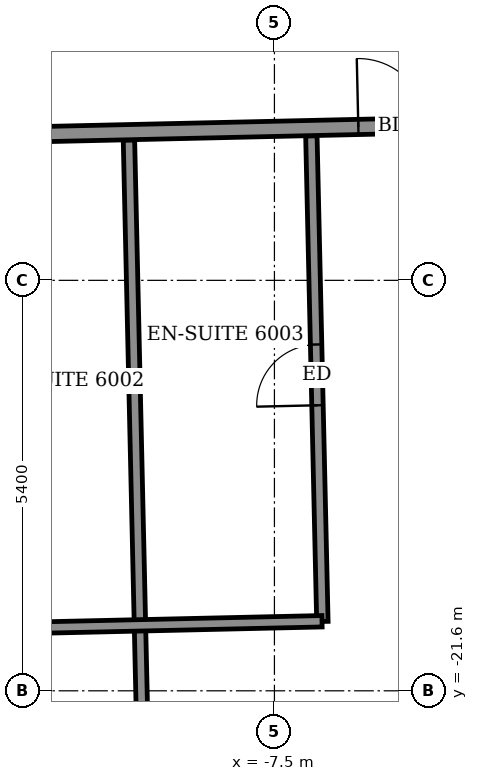
"""IFC4 building model, lengths in metres.
Left out: names, types, materials, properties, quantities, classifications, styles, units other than length and angle.
Written with IfcOpenShell. Run it as: python <this file> out.ifc"""

import sys

from ifc_helpers import new_model, si_unit, direction, frame, frame_2d, origin, place, context, subcontext, project, spatial, rectangle, extrude, element, fill, save


model = new_model("IFC4")
c1 = context("Model", 3, precision=1e-05, world=origin(), true_north=direction((0.0, 1.0)))
c2 = subcontext(c1, "Body", "Model", "MODEL_VIEW")
j1 = project(units=[si_unit("LENGTHUNIT", "METRE"), si_unit("PLANEANGLEUNIT", "RADIAN")], contexts=[c1])
p1 = place(None, origin())
s1 = spatial("IfcSite", under=j1, at=p1, CompositionType="ELEMENT")
p2 = place(p1, origin())
s2 = spatial("IfcBuilding", under=s1, at=p2, CompositionType="ELEMENT")
p3 = place(p2, frame((0.0, 0.0, 238.3)))
s3 = spatial("IfcBuildingStorey", under=s2, at=p3, CompositionType="ELEMENT", Elevation=238.3)
p4 = place(p3, frame((-9.156, -25.728, 0.0), z_axis=(0.0, 0.0, 1.0), x_axis=(-0.022684355347, 0.999742676904, 0.0)))
e1 = element("IfcWall", 1, at=p4, inside=s3, PredefinedType="PARTITIONING", context=c2, shape_type="SweptSolid", body=[
    extrude(rectangle(XDim=11.376, YDim=0.15, at=frame_2d((5.688, 0.0))), origin(), (0.0, 0.0, 1.0), 3.05),
])
p5 = place(p3, frame((-6.869, -20.688, 0.0), z_axis=(0.0, 0.0, 1.0), x_axis=(-0.022696235044, 0.99974240728, 0.0)))
e2 = element("IfcWall", 2, at=p5, inside=s3, PredefinedType="PARTITIONING", context=c2, shape_type="SweptSolid", body=[
    extrude(rectangle(XDim=6.39, YDim=0.15, at=frame_2d((3.195, 0.0))), origin(), (0.0, 0.0, 1.0), 3.05),
])
p6 = place(p5, frame((2.845, 0.0, 0.0)))
e3 = element("IfcOpeningElement", 3, at=p6, cuts=e2, PredefinedType="OPENING", context=c2, shape_type="SweptSolid", body=[
    extrude(rectangle(XDim=0.8, YDim=2.1, at=frame_2d((0.4, 1.05))), frame((0.0, 0.085, 0.0), z_axis=(0.0, -1.0, 0.0), x_axis=(1.0, 0.0, 0.0)), (0.0, 0.0, 1.0), 0.17),
])
p7 = place(p3, frame((-11.672, -20.793, 0.0), z_axis=(0.0, 0.0, 1.0), x_axis=(0.999747191239, 0.022484519337, 0.0)))
e4 = element("IfcWall", 4, at=p7, inside=s3, PredefinedType="PARTITIONING", context=c2, shape_type="SweptSolid", body=[
    extrude(rectangle(XDim=4.799, YDim=0.15, at=frame_2d((2.4, 0.0))), origin(), (0.0, 0.0, 1.0), 3.05),
])
p8 = place(p3, frame((-27.016, -14.65, 0.0), z_axis=(0.0, 0.0, 1.0), x_axis=(0.999742623033, 0.022686729391, 0.0)))
e5 = element("IfcWall", 5, at=p8, inside=s3, PredefinedType="PARTITIONING", context=c2, shape_type="SweptSolid", body=[
    extrude(rectangle(XDim=50.858, YDim=0.2, at=frame_2d((25.429, 0.0))), origin(), (0.0, 0.0, 1.0), 3.05),
])
p9 = place(p8, frame((1.625, 0.0, 0.0)))
e6 = element("IfcOpeningElement", 6, at=p9, cuts=e5, PredefinedType="OPENING", context=c2, shape_type="SweptSolid", body=[
    extrude(rectangle(XDim=1.0, YDim=2.1, at=frame_2d((0.5, 1.05))), frame((0.0, 0.11, 0.0), z_axis=(0.0, -1.0, 0.0), x_axis=(1.0, 0.0, 0.0)), (0.0, 0.0, 1.0), 0.22),
])
p10 = place(p8, frame((6.6, 0.0, 0.0)))
e7 = element("IfcOpeningElement", 7, at=p10, cuts=e5, PredefinedType="OPENING", context=c2, shape_type="SweptSolid", body=[
    extrude(rectangle(XDim=0.9, YDim=2.1, at=frame_2d((0.45, 1.05))), frame((0.0, 0.11, 0.0), z_axis=(0.0, -1.0, 0.0), x_axis=(1.0, 0.0, 0.0)), (0.0, 0.0, 1.0), 0.22),
])
p11 = place(p8, frame((11.5, 0.0, 0.0)))
e8 = element("IfcOpeningElement", 8, at=p11, cuts=e5, PredefinedType="OPENING", context=c2, shape_type="SweptSolid", body=[
    extrude(rectangle(XDim=0.9, YDim=2.1, at=frame_2d((0.45, 1.05))), frame((0.0, 0.11, 0.0), z_axis=(0.0, -1.0, 0.0), x_axis=(1.0, 0.0, 0.0)), (0.0, 0.0, 1.0), 0.22),
])
p12 = place(p8, frame((13.675, 0.0, 0.0)))
e9 = element("IfcOpeningElement", 9, at=p12, cuts=e5, PredefinedType="OPENING", context=c2, shape_type="SweptSolid", body=[
    extrude(rectangle(XDim=0.9, YDim=2.1, at=frame_2d((0.45, 1.05))), frame((0.0, 0.11, 0.0), z_axis=(0.0, -1.0, 0.0), x_axis=(1.0, 0.0, 0.0)), (0.0, 0.0, 1.0), 0.22),
])
p13 = place(p8, frame((20.625, 0.0, 0.0)))
e10 = element("IfcOpeningElement", 10, at=p13, cuts=e5, PredefinedType="OPENING", context=c2, shape_type="SweptSolid", body=[
    extrude(rectangle(XDim=0.9, YDim=2.1, at=frame_2d((0.45, 1.05))), frame((0.0, 0.11, 0.0), z_axis=(0.0, -1.0, 0.0), x_axis=(1.0, 0.0, 0.0)), (0.0, 0.0, 1.0), 0.22),
])
p14 = place(p8, frame((22.775, 0.0, 0.0)))
e11 = element("IfcOpeningElement", 11, at=p14, cuts=e5, PredefinedType="OPENING", context=c2, shape_type="SweptSolid", body=[
    extrude(rectangle(XDim=0.9, YDim=2.1, at=frame_2d((0.45, 1.05))), frame((0.0, 0.11, 0.0), z_axis=(0.0, -1.0, 0.0), x_axis=(1.0, 0.0, 0.0)), (0.0, 0.0, 1.0), 0.22),
])
p15 = place(p8, frame((29.65, 0.0, 0.0)))
e12 = element("IfcOpeningElement", 12, at=p15, cuts=e5, PredefinedType="OPENING", context=c2, shape_type="SweptSolid", body=[
    extrude(rectangle(XDim=0.9, YDim=2.1, at=frame_2d((0.45, 1.05))), frame((0.0, 0.11, 0.0), z_axis=(0.0, -1.0, 0.0), x_axis=(1.0, 0.0, 0.0)), (0.0, 0.0, 1.0), 0.22),
])
p16 = place(p8, frame((31.625, 0.0, 0.0)))
e13 = element("IfcOpeningElement", 13, at=p16, cuts=e5, PredefinedType="OPENING", context=c2, shape_type="SweptSolid", body=[
    extrude(rectangle(XDim=0.9, YDim=2.1, at=frame_2d((0.45, 1.05))), frame((0.0, 0.11, 0.0), z_axis=(0.0, -1.0, 0.0), x_axis=(1.0, 0.0, 0.0)), (0.0, 0.0, 1.0), 0.22),
])
p17 = place(p8, frame((38.5, 0.0, 0.0)))
e14 = element("IfcOpeningElement", 14, at=p17, cuts=e5, PredefinedType="OPENING", context=c2, shape_type="SweptSolid", body=[
    extrude(rectangle(XDim=0.9, YDim=2.1, at=frame_2d((0.45, 1.05))), frame((0.0, 0.11, 0.0), z_axis=(0.0, -1.0, 0.0), x_axis=(1.0, 0.0, 0.0)), (0.0, 0.0, 1.0), 0.22),
])
p18 = place(p8, frame((40.55, 0.0, 0.0)))
e15 = element("IfcOpeningElement", 15, at=p18, cuts=e5, PredefinedType="OPENING", context=c2, shape_type="SweptSolid", body=[
    extrude(rectangle(XDim=0.9, YDim=2.1, at=frame_2d((0.45, 1.05))), frame((0.0, 0.11, 0.0), z_axis=(0.0, -1.0, 0.0), x_axis=(1.0, 0.0, 0.0)), (0.0, 0.0, 1.0), 0.22),
])
p19 = place(p8, frame((47.601, 0.0, 0.0)))
e16 = element("IfcOpeningElement", 16, at=p19, cuts=e5, PredefinedType="OPENING", context=c2, shape_type="SweptSolid", body=[
    extrude(rectangle(XDim=1.0, YDim=2.1, at=frame_2d((0.5, 1.05))), frame((0.0, 0.11, 0.0), z_axis=(0.0, -1.0, 0.0), x_axis=(1.0, 0.0, 0.0)), (0.0, 0.0, 1.0), 0.22),
])
p20 = place(p13, origin())
e17 = element("IfcDoor", 17, at=p20, inside=s3, OperationType="SINGLE_SWING_LEFT", PredefinedType="DOOR", context=c2, shape_type="SweptSolid", body=[
    extrude(rectangle(XDim=0.9, YDim=2.1, at=frame_2d((0.45, 1.05))), frame((0.0, 0.025, 0.0), z_axis=(0.0, -1.0, 0.0), x_axis=(1.0, 0.0, 0.0)), (0.0, 0.0, 1.0), 0.05),
])
fill(e10, e17)
p21 = place(p6, origin())
e18 = element("IfcDoor", 18, at=p21, inside=s3, OperationType="SINGLE_SWING_LEFT", PredefinedType="DOOR", context=c2, shape_type="SweptSolid", body=[
    extrude(rectangle(XDim=0.8, YDim=2.1, at=frame_2d((0.4, 1.05))), frame((0.0, 0.025, 0.0), z_axis=(0.0, -1.0, 0.0), x_axis=(1.0, 0.0, 0.0)), (0.0, 0.0, 1.0), 0.05),
])
fill(e3, e18)
save(model, sys.argv[1])
